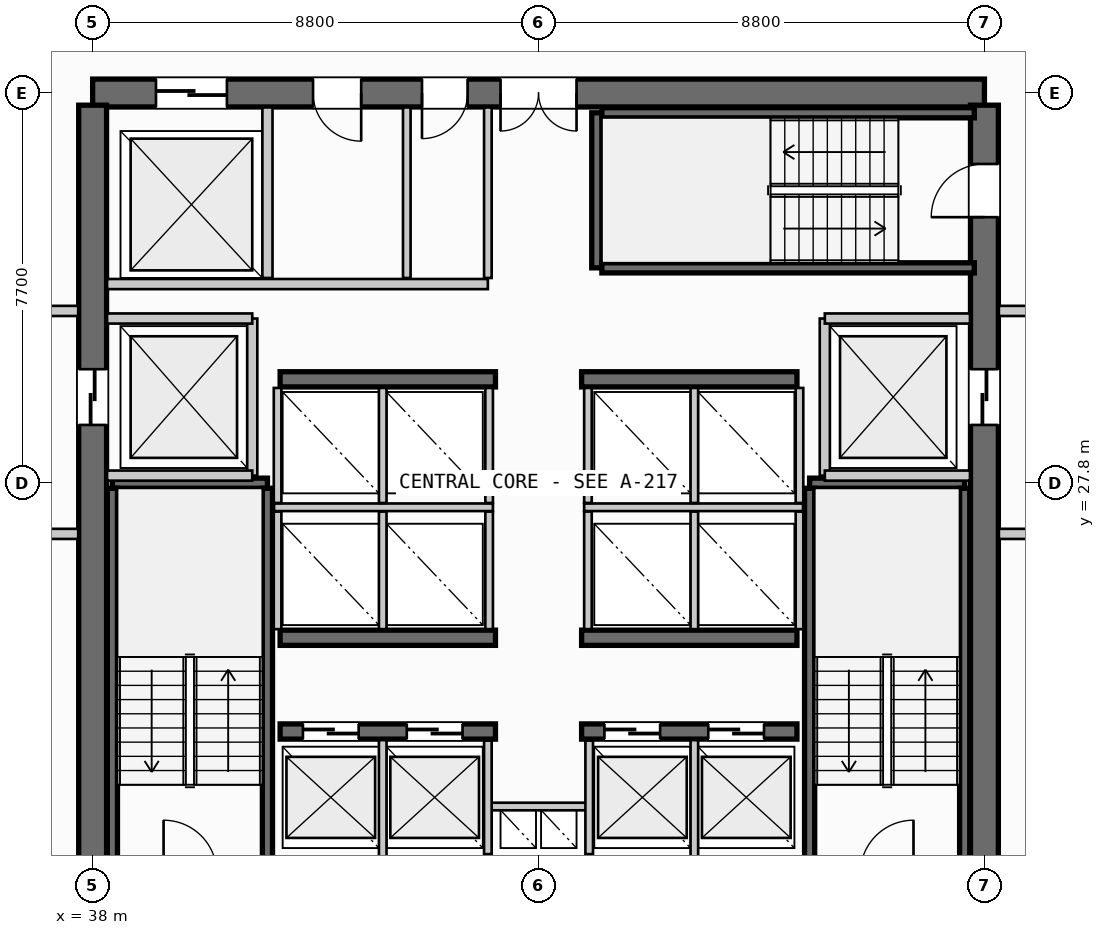
"""IFC4 building model, lengths in metres.
Left out: names, types, materials, properties, quantities, classifications, styles, units other than length and angle.
Written with IfcOpenShell. Run it as: python <this file> out.ifc"""

import sys

from ifc_helpers import new_model, si_unit, direction, frame, frame_2d, origin, place, context, subcontext, project, spatial, rectangle, extrude, source, transform, mapped, element, fill, save


model = new_model("IFC4")
c1 = context("Model", 3, precision=1e-05, world=origin(), true_north=direction((0.0, 1.0)))
c2 = subcontext(c1, "Body", "Model", "MODEL_VIEW")
j1 = project(units=[si_unit("LENGTHUNIT", "METRE"), si_unit("PLANEANGLEUNIT", "RADIAN")], contexts=[c1])
p1 = place(None, origin())
s1 = spatial("IfcSite", under=j1, at=p1, CompositionType="ELEMENT")
p2 = place(p1, origin())
s2 = spatial("IfcBuilding", under=s1, at=p2, CompositionType="ELEMENT")
p3 = place(p2, frame((0.0, 0.0, 121.6)))
s3 = spatial("IfcBuildingStorey", under=s2, at=p3, CompositionType="ELEMENT", Elevation=121.6)
p4 = place(p3, frame((55.6, 35.5, 0.0), z_axis=(0.0, 0.0, 1.0), x_axis=(-1.0, 0.0, 0.0)))
e1 = element("IfcWall", 1, at=p4, inside=s3, PredefinedType="SHEAR", context=c2, shape_type="SweptSolid", body=[
    extrude(rectangle(XDim=17.6, YDim=0.55, at=frame_2d((8.8, 0.0))), origin(), (0.0, 0.0, 1.0), 3.35),
])
p5 = place(p4, frame((8.05, 0.0, 0.0)))
e2 = element("IfcOpeningElement", 2, at=p5, cuts=e1, PredefinedType="OPENING", context=c2, shape_type="SweptSolid", body=[
    extrude(rectangle(XDim=1.5, YDim=2.2, at=frame_2d((0.75, 1.1))), frame((0.0, 0.285, 0.0), z_axis=(0.0, -1.0, 0.0), x_axis=(1.0, 0.0, 0.0)), (0.0, 0.0, 1.0), 0.57),
])
p6 = place(p4, frame((14.95, 0.0, 0.0)))
e3 = element("IfcOpeningElement", 3, at=p6, cuts=e1, PredefinedType="OPENING", context=c2, shape_type="SweptSolid", body=[
    extrude(rectangle(XDim=1.4, YDim=2.3, at=frame_2d((0.7, 1.15))), frame((0.0, 0.285, 0.0), z_axis=(0.0, -1.0, 0.0), x_axis=(1.0, 0.0, 0.0)), (0.0, 0.0, 1.0), 0.57),
])
p7 = place(p4, frame((12.3, 0.0, 0.0)))
e4 = element("IfcOpeningElement", 4, at=p7, cuts=e1, PredefinedType="OPENING", context=c2, shape_type="SweptSolid", body=[
    extrude(rectangle(XDim=0.95, YDim=2.15, at=frame_2d((0.475, 1.075))), frame((0.0, 0.285, 0.0), z_axis=(0.0, -1.0, 0.0), x_axis=(1.0, 0.0, 0.0)), (0.0, 0.0, 1.0), 0.57),
])
p8 = place(p4, frame((10.2, 0.0, 0.0)))
e5 = element("IfcOpeningElement", 5, at=p8, cuts=e1, PredefinedType="OPENING", context=c2, shape_type="SweptSolid", body=[
    extrude(rectangle(XDim=0.9, YDim=2.15, at=frame_2d((0.45, 1.075))), frame((0.0, 0.285, 0.0), z_axis=(0.0, -1.0, 0.0), x_axis=(1.0, 0.0, 0.0)), (0.0, 0.0, 1.0), 0.57),
])
p9 = place(p3, frame((38.0, 35.26, 0.0), z_axis=(0.0, 0.0, 1.0), x_axis=(0.0, -1.0, 0.0)))
e6 = element("IfcWall", 6, at=p9, inside=s3, PredefinedType="SHEAR", context=c2, shape_type="SweptSolid", body=[
    extrude(rectangle(XDim=14.92, YDim=0.55, at=frame_2d((7.46, 0.0))), origin(), (0.0, 0.0, 1.0), 3.35),
])
p10 = place(p9, frame((5.21, 0.0, 0.0)))
e7 = element("IfcOpeningElement", 7, at=p10, cuts=e6, PredefinedType="OPENING", context=c2, shape_type="SweptSolid", body=[
    extrude(rectangle(XDim=1.1, YDim=2.2, at=frame_2d((0.55, 1.1))), frame((0.0, 0.285, 0.0), z_axis=(0.0, -1.0, 0.0), x_axis=(1.0, 0.0, 0.0)), (0.0, 0.0, 1.0), 0.57),
])
p11 = place(p3, frame((55.6, 20.34, 0.0), z_axis=(0.0, 0.0, 1.0), x_axis=(0.0, 1.0, 0.0)))
e8 = element("IfcWall", 8, at=p11, inside=s3, PredefinedType="SHEAR", context=c2, shape_type="SweptSolid", body=[
    extrude(rectangle(XDim=14.92, YDim=0.55, at=frame_2d((7.46, 0.0))), origin(), (0.0, 0.0, 1.0), 3.35),
])
p12 = place(p11, frame((12.71, 0.0, 0.0)))
e9 = element("IfcOpeningElement", 9, at=p12, cuts=e8, PredefinedType="OPENING", context=c2, shape_type="SweptSolid", body=[
    extrude(rectangle(XDim=1.05, YDim=2.15, at=frame_2d((0.525, 1.075))), frame((0.0, 0.285, 0.0), z_axis=(0.0, -1.0, 0.0), x_axis=(1.0, 0.0, 0.0)), (0.0, 0.0, 1.0), 0.57),
])
p13 = place(p11, frame((8.61, 0.0, 0.0)))
e10 = element("IfcOpeningElement", 10, at=p13, cuts=e8, PredefinedType="OPENING", context=c2, shape_type="SweptSolid", body=[
    extrude(rectangle(XDim=1.1, YDim=2.2, at=frame_2d((0.55, 1.1))), frame((0.0, 0.285, 0.0), z_axis=(0.0, -1.0, 0.0), x_axis=(1.0, 0.0, 0.0)), (0.0, 0.0, 1.0), 0.57),
])
p14 = place(p3, frame((41.7, 22.9, 0.0), z_axis=(0.0, 0.0, 1.0), x_axis=(1.0, 0.0, 0.0)))
e11 = element("IfcWall", 11, at=p14, inside=s3, PredefinedType="SHEAR", context=c2, shape_type="SweptSolid", body=[
    extrude(rectangle(XDim=4.25, YDim=0.3, at=frame_2d((2.125, 0.0))), origin(), (0.0, 0.0, 1.0), 3.35),
])
p15 = place(p14, frame((0.45, 0.0, 0.0)))
e12 = element("IfcOpeningElement", 12, at=p15, cuts=e11, PredefinedType="OPENING", context=c2, shape_type="SweptSolid", body=[
    extrude(rectangle(XDim=1.1, YDim=2.2, at=frame_2d((0.55, 1.1))), frame((0.0, 0.16, 0.0), z_axis=(0.0, -1.0, 0.0), x_axis=(1.0, 0.0, 0.0)), (0.0, 0.0, 1.0), 0.32),
])
p16 = place(p14, frame((2.5, 0.0, 0.0)))
e13 = element("IfcOpeningElement", 13, at=p16, cuts=e11, PredefinedType="OPENING", context=c2, shape_type="SweptSolid", body=[
    extrude(rectangle(XDim=1.1, YDim=2.2, at=frame_2d((0.55, 1.1))), frame((0.0, 0.16, 0.0), z_axis=(0.0, -1.0, 0.0), x_axis=(1.0, 0.0, 0.0)), (0.0, 0.0, 1.0), 0.32),
])
p17 = place(p3, frame((47.65, 22.9, 0.0), z_axis=(0.0, 0.0, 1.0), x_axis=(1.0, 0.0, 0.0)))
e14 = element("IfcWall", 14, at=p17, inside=s3, PredefinedType="SHEAR", context=c2, shape_type="SweptSolid", body=[
    extrude(rectangle(XDim=4.25, YDim=0.3, at=frame_2d((2.125, 0.0))), origin(), (0.0, 0.0, 1.0), 3.35),
])
p18 = place(p17, frame((0.45, 0.0, 0.0)))
e15 = element("IfcOpeningElement", 15, at=p18, cuts=e14, PredefinedType="OPENING", context=c2, shape_type="SweptSolid", body=[
    extrude(rectangle(XDim=1.1, YDim=2.2, at=frame_2d((0.55, 1.1))), frame((0.0, 0.16, 0.0), z_axis=(0.0, -1.0, 0.0), x_axis=(1.0, 0.0, 0.0)), (0.0, 0.0, 1.0), 0.32),
])
p19 = place(p17, frame((2.5, 0.0, 0.0)))
e16 = element("IfcOpeningElement", 16, at=p19, cuts=e14, PredefinedType="OPENING", context=c2, shape_type="SweptSolid", body=[
    extrude(rectangle(XDim=1.1, YDim=2.2, at=frame_2d((0.55, 1.1))), frame((0.0, 0.16, 0.0), z_axis=(0.0, -1.0, 0.0), x_axis=(1.0, 0.0, 0.0)), (0.0, 0.0, 1.0), 0.32),
])
for number, where, z_axis, x_axis in (
    (17, (41.7, 24.75, 0.0), (0.0, 0.0, 1.0), (1.0, 0.0, 0.0)),
    (18, (47.65, 24.75, 0.0), (0.0, 0.0, 1.0), (1.0, 0.0, 0.0)),
    (19, (41.7, 29.85, 0.0), (0.0, 0.0, 1.0), (1.0, 0.0, 0.0)),
    (20, (47.65, 29.85, 0.0), (0.0, 0.0, 1.0), (1.0, 0.0, 0.0)),
):
    element("IfcWall", number, at=place(p3, frame(where, z_axis=z_axis, x_axis=x_axis)), inside=s3, PredefinedType="SHEAR", context=c2, shape_type="SweptSolid", body=[
        extrude(rectangle(XDim=4.25, YDim=0.3, at=frame_2d((2.125, 0.0))), origin(), (0.0, 0.0, 1.0), 3.35),
    ])
p20 = place(p3, frame((38.39, 27.8, 0.0), z_axis=(0.0, 0.0, 1.0), x_axis=(1.0, 0.0, 0.0)))
e21 = element("IfcWall", 21, at=p20, inside=s3, PredefinedType="SHEAR", context=c2, shape_type="SweptSolid", body=[
    extrude(rectangle(XDim=3.06, YDim=0.2, at=frame_2d((1.53, 0.0))), origin(), (0.0, 0.0, 1.0), 3.35),
])
for number, where, z_axis, x_axis in (
    (22, (41.45, 27.7, 0.0), (0.0, 0.0, 1.0), (0.0, -1.0, 0.0)),
    (23, (38.39, 20.35, 0.0), (0.0, 0.0, 1.0), (0.0, 1.0, 0.0)),
):
    element("IfcWall", number, at=place(p3, frame(where, z_axis=z_axis, x_axis=x_axis)), inside=s3, PredefinedType="SHEAR", context=c2, shape_type="SweptSolid", body=[
        extrude(rectangle(XDim=7.35, YDim=0.2, at=frame_2d((3.675, 0.0))), origin(), (0.0, 0.0, 1.0), 3.35),
    ])
p21 = place(p3, frame((52.15, 27.8, 0.0), z_axis=(0.0, 0.0, 1.0), x_axis=(1.0, 0.0, 0.0)))
e24 = element("IfcWall", 24, at=p21, inside=s3, PredefinedType="SHEAR", context=c2, shape_type="SweptSolid", body=[
    extrude(rectangle(XDim=3.06, YDim=0.2, at=frame_2d((1.53, 0.0))), origin(), (0.0, 0.0, 1.0), 3.35),
])
for number, where, z_axis, x_axis in (
    (25, (55.21, 27.7, 0.0), (0.0, 0.0, 1.0), (0.0, -1.0, 0.0)),
    (26, (52.15, 20.35, 0.0), (0.0, 0.0, 1.0), (0.0, 1.0, 0.0)),
):
    element("IfcWall", number, at=place(p3, frame(where, z_axis=z_axis, x_axis=x_axis)), inside=s3, PredefinedType="SHEAR", context=c2, shape_type="SweptSolid", body=[
        extrude(rectangle(XDim=7.35, YDim=0.2, at=frame_2d((3.675, 0.0))), origin(), (0.0, 0.0, 1.0), 3.35),
    ])
p22 = place(p3, frame((47.95, 32.05, 0.0), z_axis=(0.0, 0.0, 1.0), x_axis=(0.0, 1.0, 0.0)))
e27 = element("IfcWall", 27, at=p22, inside=s3, PredefinedType="SHEAR", context=c2, shape_type="SweptSolid", body=[
    extrude(rectangle(XDim=3.06, YDim=0.2, at=frame_2d((1.53, 0.0))), origin(), (0.0, 0.0, 1.0), 3.35),
])
for number, where, z_axis, x_axis in (
    (28, (48.05, 35.11, 0.0), (0.0, 0.0, 1.0), (1.0, 0.0, 0.0)),
    (29, (55.4, 32.05, 0.0), (0.0, 0.0, 1.0), (-1.0, 0.0, 0.0)),
):
    element("IfcWall", number, at=place(p3, frame(where, z_axis=z_axis, x_axis=x_axis)), inside=s3, PredefinedType="SHEAR", context=c2, shape_type="SweptSolid", body=[
        extrude(rectangle(XDim=7.35, YDim=0.2, at=frame_2d((3.675, 0.0))), origin(), (0.0, 0.0, 1.0), 3.35),
    ])
p23 = place(p3, frame((45.8, 21.42, 0.0), z_axis=(0.0, 0.0, 1.0), x_axis=(1.0, 0.0, 0.0)))
e30 = element("IfcWall", 30, at=p23, inside=s3, PredefinedType="PARTITIONING", context=c2, shape_type="SweptSolid", body=[
    extrude(rectangle(XDim=2.0, YDim=0.15, at=frame_2d((1.0, 0.0))), origin(), (0.0, 0.0, 1.0), 2.775),
])
for number, where, z_axis, x_axis in (
    (31, (45.8, 20.48, 0.0), (0.0, 0.0, 1.0), (0.0, 1.0, 0.0)),
    (32, (47.8, 20.48, 0.0), (0.0, 0.0, 1.0), (0.0, 1.0, 0.0)),
):
    element("IfcWall", number, at=place(p3, frame(where, z_axis=z_axis, x_axis=x_axis)), inside=s3, PredefinedType="PARTITIONING", context=c2, shape_type="SweptSolid", body=[
        extrude(rectangle(XDim=2.24, YDim=0.15, at=frame_2d((1.12, 0.0))), origin(), (0.0, 0.0, 1.0), 2.775),
    ])
p24 = place(p3, frame((41.15, 27.95, 0.0), z_axis=(0.0, 0.0, 1.0), x_axis=(0.0, 1.0, 0.0)))
e33 = element("IfcWall", 33, at=p24, inside=s3, PredefinedType="PARTITIONING", context=c2, shape_type="SweptSolid", body=[
    extrude(rectangle(XDim=3.1, YDim=0.2, at=frame_2d((1.55, 0.0))), origin(), (0.0, 0.0, 1.0), 2.775),
])
for number, where, z_axis, x_axis in (
    (34, (38.285, 27.95, 0.0), (0.0, 0.0, 1.0), (1.0, 0.0, 0.0)),
    (35, (38.285, 31.05, 0.0), (0.0, 0.0, 1.0), (1.0, 0.0, 0.0)),
):
    element("IfcWall", number, at=place(p3, frame(where, z_axis=z_axis, x_axis=x_axis)), inside=s3, PredefinedType="PARTITIONING", context=c2, shape_type="SweptSolid", body=[
        extrude(rectangle(XDim=2.865, YDim=0.2, at=frame_2d((1.433, 0.0))), origin(), (0.0, 0.0, 1.0), 2.775),
    ])
for number, where, z_axis, x_axis in (
    (36, (34.5, 26.8, 0.0), (0.0, 0.0, 1.0), (1.0, 0.0, 0.0)),
    (37, (34.5, 31.2, 0.0), (0.0, 0.0, 1.0), (1.0, 0.0, 0.0)),
):
    element("IfcWall", number, at=place(p3, frame(where, z_axis=z_axis, x_axis=x_axis)), inside=s3, PredefinedType="PARTITIONING", context=c2, shape_type="SweptSolid", body=[
        extrude(rectangle(XDim=3.215, YDim=0.2, at=frame_2d((1.607, 0.0))), origin(), (0.0, 0.0, 1.0), 2.775),
    ])
p25 = place(p3, frame((52.45, 27.95, 0.0), z_axis=(0.0, 0.0, 1.0), x_axis=(0.0, 1.0, 0.0)))
e38 = element("IfcWall", 38, at=p25, inside=s3, PredefinedType="PARTITIONING", context=c2, shape_type="SweptSolid", body=[
    extrude(rectangle(XDim=3.1, YDim=0.2, at=frame_2d((1.55, 0.0))), origin(), (0.0, 0.0, 1.0), 2.775),
])
for number, where, z_axis, x_axis in (
    (39, (52.45, 27.95, 0.0), (0.0, 0.0, 1.0), (1.0, 0.0, 0.0)),
    (40, (52.45, 31.05, 0.0), (0.0, 0.0, 1.0), (1.0, 0.0, 0.0)),
):
    element("IfcWall", number, at=place(p3, frame(where, z_axis=z_axis, x_axis=x_axis)), inside=s3, PredefinedType="PARTITIONING", context=c2, shape_type="SweptSolid", body=[
        extrude(rectangle(XDim=2.865, YDim=0.2, at=frame_2d((1.433, 0.0))), origin(), (0.0, 0.0, 1.0), 2.775),
    ])
for number, where, z_axis, x_axis in (
    (41, (55.885, 26.8, 0.0), (0.0, 0.0, 1.0), (1.0, 0.0, 0.0)),
    (42, (55.885, 31.2, 0.0), (0.0, 0.0, 1.0), (1.0, 0.0, 0.0)),
):
    element("IfcWall", number, at=place(p3, frame(where, z_axis=z_axis, x_axis=x_axis)), inside=s3, PredefinedType="PARTITIONING", context=c2, shape_type="SweptSolid", body=[
        extrude(rectangle(XDim=3.215, YDim=0.2, at=frame_2d((1.607, 0.0))), origin(), (0.0, 0.0, 1.0), 2.775),
    ])
for number, where, z_axis, x_axis in (
    (43, (43.725, 20.385, 0.0), (0.0, 0.0, 1.0), (0.0, 1.0, 0.0)),
    (44, (49.875, 20.385, 0.0), (0.0, 0.0, 1.0), (0.0, 1.0, 0.0)),
):
    element("IfcWall", number, at=place(p3, frame(where, z_axis=z_axis, x_axis=x_axis)), inside=s3, PredefinedType="PARTITIONING", context=c2, shape_type="SweptSolid", body=[
        extrude(rectangle(XDim=2.345, YDim=0.15, at=frame_2d((1.172, 0.0))), origin(), (0.0, 0.0, 1.0), 2.775),
    ])
p26 = place(p3, frame((41.58, 27.325, 0.0), z_axis=(0.0, 0.0, 1.0), x_axis=(1.0, 0.0, 0.0)))
e45 = element("IfcWall", 45, at=p26, inside=s3, PredefinedType="PARTITIONING", context=c2, shape_type="SweptSolid", body=[
    extrude(rectangle(XDim=4.32, YDim=0.15, at=frame_2d((2.16, 0.0))), origin(), (0.0, 0.0, 1.0), 2.775),
])
p27 = place(p3, frame((47.7, 27.325, 0.0), z_axis=(0.0, 0.0, 1.0), x_axis=(1.0, 0.0, 0.0)))
e46 = element("IfcWall", 46, at=p27, inside=s3, PredefinedType="PARTITIONING", context=c2, shape_type="SweptSolid", body=[
    extrude(rectangle(XDim=4.32, YDim=0.15, at=frame_2d((2.16, 0.0))), origin(), (0.0, 0.0, 1.0), 2.775),
])
for number, where, z_axis, x_axis in (
    (47, (41.65, 24.92, 0.0), (0.0, 0.0, 1.0), (0.0, 1.0, 0.0)),
    (48, (43.725, 24.92, 0.0), (0.0, 0.0, 1.0), (0.0, 1.0, 0.0)),
    (49, (45.825, 24.92, 0.0), (0.0, 0.0, 1.0), (0.0, 1.0, 0.0)),
    (50, (47.775, 24.92, 0.0), (0.0, 0.0, 1.0), (0.0, 1.0, 0.0)),
    (51, (49.875, 24.92, 0.0), (0.0, 0.0, 1.0), (0.0, 1.0, 0.0)),
    (52, (51.95, 24.92, 0.0), (0.0, 0.0, 1.0), (0.0, 1.0, 0.0)),
):
    element("IfcWall", number, at=place(p3, frame(where, z_axis=z_axis, x_axis=x_axis)), inside=s3, PredefinedType="PARTITIONING", context=c2, shape_type="SweptSolid", body=[
        extrude(rectangle(XDim=2.32, YDim=0.15, at=frame_2d((1.16, 0.0))), origin(), (0.0, 0.0, 1.0), 2.775),
    ])
for number, where, z_axis, x_axis in (
    (53, (41.65, 27.41, 0.0), (0.0, 0.0, 1.0), (0.0, 1.0, 0.0)),
    (54, (43.725, 27.41, 0.0), (0.0, 0.0, 1.0), (0.0, 1.0, 0.0)),
    (55, (45.825, 27.41, 0.0), (0.0, 0.0, 1.0), (0.0, 1.0, 0.0)),
    (56, (47.775, 27.41, 0.0), (0.0, 0.0, 1.0), (0.0, 1.0, 0.0)),
    (57, (49.875, 27.41, 0.0), (0.0, 0.0, 1.0), (0.0, 1.0, 0.0)),
    (58, (51.95, 27.41, 0.0), (0.0, 0.0, 1.0), (0.0, 1.0, 0.0)),
):
    element("IfcWall", number, at=place(p3, frame(where, z_axis=z_axis, x_axis=x_axis)), inside=s3, PredefinedType="PARTITIONING", context=c2, shape_type="SweptSolid", body=[
        extrude(rectangle(XDim=2.27, YDim=0.15, at=frame_2d((1.135, 0.0))), origin(), (0.0, 0.0, 1.0), 2.775),
    ])
p28 = place(p3, frame((41.45, 31.85, 0.0), z_axis=(0.0, 0.0, 1.0), x_axis=(0.0, 1.0, 0.0)))
e59 = element("IfcWall", 59, at=p28, inside=s3, PredefinedType="PARTITIONING", context=c2, shape_type="SweptSolid", body=[
    extrude(rectangle(XDim=3.365, YDim=0.2, at=frame_2d((1.683, 0.0))), origin(), (0.0, 0.0, 1.0), 2.775),
])
p29 = place(p3, frame((38.285, 31.73, 0.0), z_axis=(0.0, 0.0, 1.0), x_axis=(1.0, 0.0, 0.0)))
e60 = element("IfcWall", 60, at=p29, inside=s3, PredefinedType="PARTITIONING", context=c2, shape_type="SweptSolid", body=[
    extrude(rectangle(XDim=7.515, YDim=0.2, at=frame_2d((3.758, 0.0))), origin(), (0.0, 0.0, 1.0), 2.775),
])
p30 = place(p3, frame((45.8, 31.85, 0.0), z_axis=(0.0, 0.0, 1.0), x_axis=(0.0, 1.0, 0.0)))
e61 = element("IfcWall", 61, at=p30, inside=s3, PredefinedType="PARTITIONING", context=c2, shape_type="SweptSolid", body=[
    extrude(rectangle(XDim=3.365, YDim=0.15, at=frame_2d((1.683, 0.0))), origin(), (0.0, 0.0, 1.0), 2.775),
])
p31 = place(p3, frame((44.2, 31.85, 0.0), z_axis=(0.0, 0.0, 1.0), x_axis=(0.0, 1.0, 0.0)))
e62 = element("IfcWall", 62, at=p31, inside=s3, PredefinedType="PLUMBINGWALL", context=c2, shape_type="SweptSolid", body=[
    extrude(rectangle(XDim=3.365, YDim=0.15, at=frame_2d((1.683, 0.0))), origin(), (0.0, 0.0, 1.0), 2.775),
])
m1 = source(origin(), c2, "Body", "SweptSolid", [
    extrude(rectangle(XDim=1.05, YDim=2.15, at=frame_2d((0.525, 1.075))), frame((0.0, 0.025, 0.0), z_axis=(0.0, -1.0, 0.0), x_axis=(1.0, 0.0, 0.0)), (0.0, 0.0, 1.0), 0.05),
])
p32 = place(p12, origin())
e63 = element("IfcDoor", 63, at=p32, inside=s3, OperationType="SINGLE_SWING_LEFT", PredefinedType="DOOR", context=c2, shape_type="MappedRepresentation", body=[
    mapped(m1, transform((0.0, 0.0, 0.0), scale=1.0)),
])
fill(e9, e63)
m2 = source(origin(), c2, "Body", "SweptSolid", [
    extrude(rectangle(XDim=1.5, YDim=2.2, at=frame_2d((0.75, 1.1))), frame((0.0, 0.025, 0.0), z_axis=(0.0, -1.0, 0.0), x_axis=(1.0, 0.0, 0.0)), (0.0, 0.0, 1.0), 0.05),
])
p33 = place(p5, origin())
e64 = element("IfcDoor", 64, at=p33, inside=s3, OperationType="DOUBLE_DOOR_SINGLE_SWING", PredefinedType="DOOR", context=c2, shape_type="MappedRepresentation", body=[
    mapped(m2, transform((0.0, 0.0, 0.0), scale=1.0)),
])
fill(e2, e64)
m3 = source(origin(), c2, "Body", "SweptSolid", [
    extrude(rectangle(XDim=1.1, YDim=2.2, at=frame_2d((0.55, 1.1))), frame((0.0, 0.025, 0.0), z_axis=(0.0, -1.0, 0.0), x_axis=(1.0, 0.0, 0.0)), (0.0, 0.0, 1.0), 0.05),
])
p34 = place(p10, origin())
e65 = element("IfcDoor", 65, at=p34, inside=s3, OperationType="SLIDING_TO_LEFT", PredefinedType="DOOR", context=c2, shape_type="MappedRepresentation", body=[
    mapped(m3, transform((0.0, 0.0, 0.0), scale=1.0)),
])
fill(e7, e65)
p35 = place(p13, origin())
e66 = element("IfcDoor", 66, at=p35, inside=s3, OperationType="SLIDING_TO_RIGHT", PredefinedType="DOOR", context=c2, shape_type="MappedRepresentation", body=[
    mapped(m3, transform((0.0, 0.0, 0.0), scale=1.0)),
])
fill(e10, e66)
p36 = place(p15, origin())
e67 = element("IfcDoor", 67, at=p36, inside=s3, OperationType="SLIDING_TO_LEFT", PredefinedType="DOOR", context=c2, shape_type="MappedRepresentation", body=[
    mapped(m3, transform((0.0, 0.0, 0.0), scale=1.0)),
])
fill(e12, e67)
p37 = place(p16, origin())
e68 = element("IfcDoor", 68, at=p37, inside=s3, OperationType="SLIDING_TO_LEFT", PredefinedType="DOOR", context=c2, shape_type="MappedRepresentation", body=[
    mapped(m3, transform((0.0, 0.0, 0.0), scale=1.0)),
])
fill(e13, e68)
p38 = place(p18, origin())
e69 = element("IfcDoor", 69, at=p38, inside=s3, OperationType="SLIDING_TO_LEFT", PredefinedType="DOOR", context=c2, shape_type="MappedRepresentation", body=[
    mapped(m3, transform((0.0, 0.0, 0.0), scale=1.0)),
])
fill(e15, e69)
p39 = place(p19, origin())
e70 = element("IfcDoor", 70, at=p39, inside=s3, OperationType="SLIDING_TO_LEFT", PredefinedType="DOOR", context=c2, shape_type="MappedRepresentation", body=[
    mapped(m3, transform((0.0, 0.0, 0.0), scale=1.0)),
])
fill(e16, e70)
m4 = source(origin(), c2, "Body", "SweptSolid", [
    extrude(rectangle(XDim=1.4, YDim=2.3, at=frame_2d((0.7, 1.15))), frame((0.0, 0.025, 0.0), z_axis=(0.0, -1.0, 0.0), x_axis=(1.0, 0.0, 0.0)), (0.0, 0.0, 1.0), 0.05),
])
p40 = place(p6, origin())
e71 = element("IfcDoor", 71, at=p40, inside=s3, OperationType="SLIDING_TO_RIGHT", PredefinedType="DOOR", context=c2, shape_type="MappedRepresentation", body=[
    mapped(m4, transform((0.0, 0.0, 0.0), scale=1.0)),
])
fill(e3, e71)
m5 = source(origin(), c2, "Body", "SweptSolid", [
    extrude(rectangle(XDim=0.95, YDim=2.15, at=frame_2d((0.475, 1.075))), frame((0.0, 0.025, 0.0), z_axis=(0.0, -1.0, 0.0), x_axis=(1.0, 0.0, 0.0)), (0.0, 0.0, 1.0), 0.05),
])
p41 = place(p7, origin())
e72 = element("IfcDoor", 72, at=p41, inside=s3, OperationType="SINGLE_SWING_LEFT", PredefinedType="DOOR", context=c2, shape_type="MappedRepresentation", body=[
    mapped(m5, transform((0.0, 0.0, 0.0), scale=1.0)),
])
fill(e4, e72)
m6 = source(origin(), c2, "Body", "SweptSolid", [
    extrude(rectangle(XDim=0.9, YDim=2.15, at=frame_2d((0.45, 1.075))), frame((0.0, 0.025, 0.0), z_axis=(0.0, -1.0, 0.0), x_axis=(1.0, 0.0, 0.0)), (0.0, 0.0, 1.0), 0.05),
])
p42 = place(p8, origin())
e73 = element("IfcDoor", 73, at=p42, inside=s3, OperationType="SINGLE_SWING_RIGHT", PredefinedType="DOOR", context=c2, shape_type="MappedRepresentation", body=[
    mapped(m6, transform((0.0, 0.0, 0.0), scale=1.0)),
])
fill(e5, e73)
save(model, sys.argv[1])
